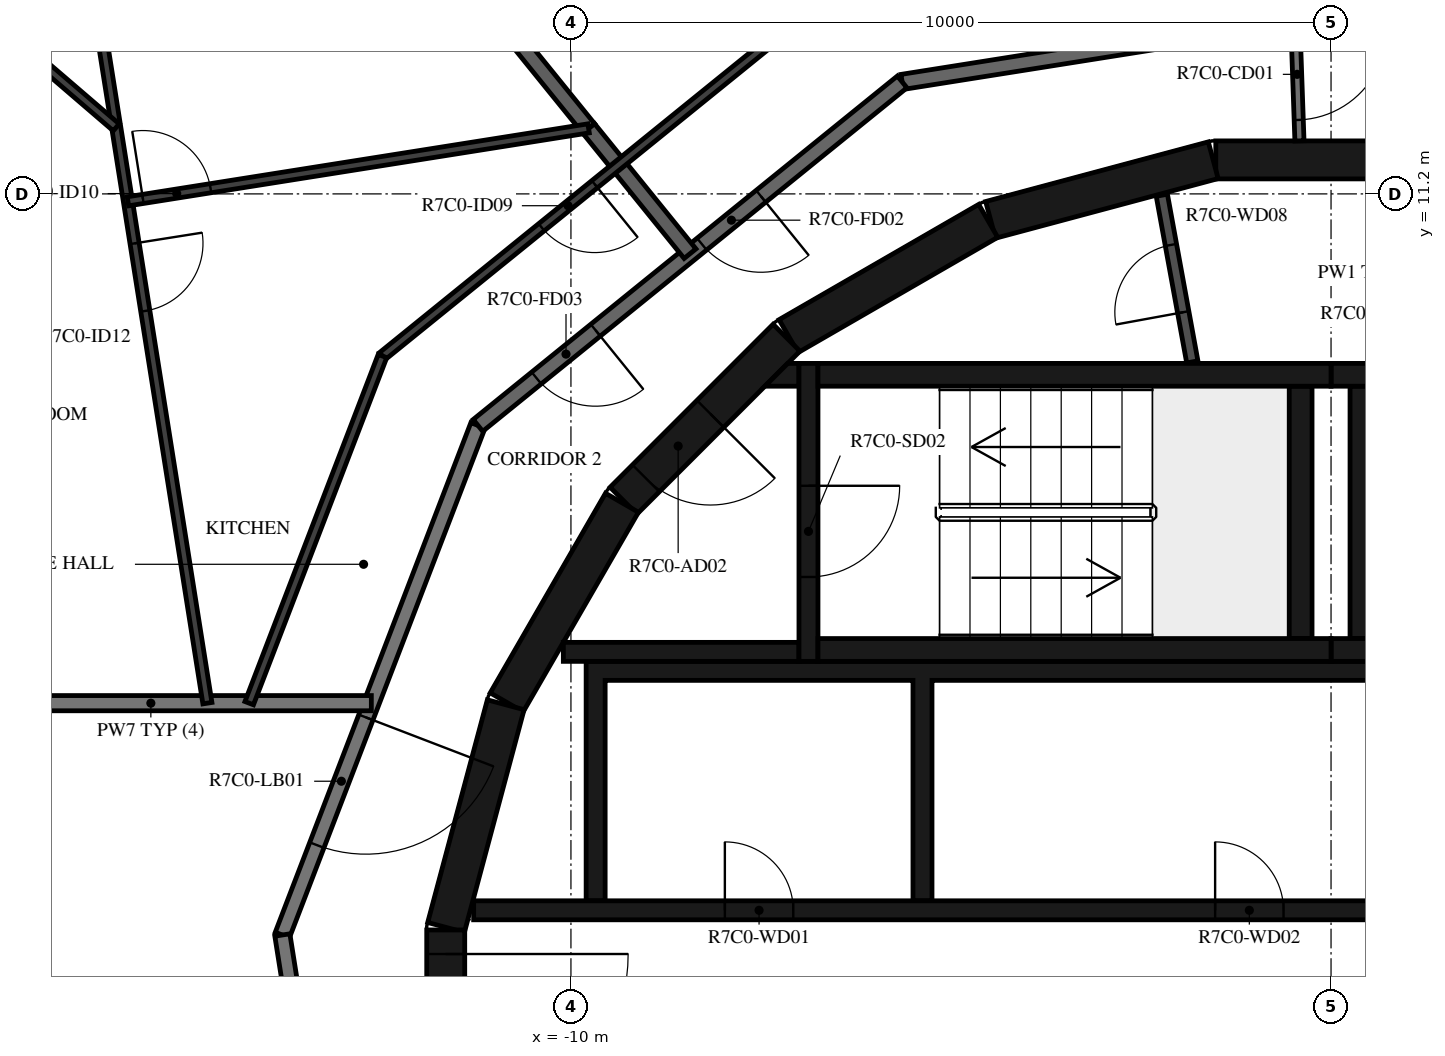
"""IFC4 building model, lengths in metres.
Left out: names, types, materials, properties, quantities, classifications, styles, units other than length and angle.
Written with IfcOpenShell. Run it as: python <this file> out.ifc"""

import sys

from ifc_helpers import new_model, si_unit, direction, frame, frame_2d, origin, place, context, subcontext, project, spatial, polyline, rectangle, outline, extrude, element, fill, save


model = new_model("IFC4")
c1 = context("Model", 3, precision=1e-05, world=origin(), true_north=direction((0.0, 1.0)))
c2 = subcontext(c1, "Body", "Model", "MODEL_VIEW")
j1 = project(units=[si_unit("LENGTHUNIT", "METRE"), si_unit("PLANEANGLEUNIT", "RADIAN")], contexts=[c1])
p1 = place(None, origin())
s1 = spatial("IfcSite", under=j1, at=p1, CompositionType="ELEMENT")
p2 = place(p1, origin())
s2 = spatial("IfcBuilding", under=s1, at=p2, CompositionType="ELEMENT")
p3 = place(p2, frame((0.0, 0.0, 284.4)))
s3 = spatial("IfcBuildingStorey", under=s2, at=p3, CompositionType="ELEMENT", Elevation=284.4)
for number, where, z_axis, x_axis in (
    (1, (1.516, 11.647, 0.0), (0.0, 0.0, 1.0), (-1.0, 0.0, 0.0)),
    (2, (-1.55, 11.643, 0.0), (0.0, 0.0, 1.0), (-0.966, -0.259, 0.0)),
    (3, (-4.51, 10.845, 0.0), (0.0, 0.0, 1.0), (-0.866, -0.5, 0.0)),
):
    element("IfcWall", number, at=place(p3, frame(where, z_axis=z_axis, x_axis=x_axis)), inside=s3, PredefinedType="SHEAR", context=c2, shape_type="SweptSolid", body=[
        extrude(rectangle(XDim=3.033, YDim=0.5, at=frame_2d((1.516, 0.0))), origin(), (0.0, 0.0, 1.0), 3.12),
    ])
p4 = place(p3, frame((-7.164, 9.308, 0.0), z_axis=(0.0, 0.0, 1.0), x_axis=(-0.707106781187, -0.707106781187, 0.0)))
e4 = element("IfcWall", 4, at=p4, inside=s3, PredefinedType="SHEAR", context=c2, shape_type="SweptSolid", body=[
    extrude(rectangle(XDim=3.032, YDim=0.5, at=frame_2d((1.516, 0.0))), origin(), (0.0, 0.0, 1.0), 3.12),
])
p5 = place(p4, frame((1.416, 0.0, 0.0)))
e5 = element("IfcOpeningElement", 5, at=p5, cuts=e4, PredefinedType="OPENING", context=c2, shape_type="SweptSolid", body=[
    extrude(rectangle(XDim=1.2, YDim=2.1, at=frame_2d((0.6, 1.05))), frame((0.0, 0.26, 0.0), z_axis=(0.0, -1.0, 0.0), x_axis=(1.0, 0.0, 0.0)), (0.0, 0.0, 1.0), 0.52),
])
for number, where, z_axis, x_axis in (
    (6, (-9.329, 7.137, 0.0), (0.0, 0.0, 1.0), (-0.5, -0.866, 0.0)),
    (7, (-10.858, 4.479, 0.0), (0.0, 0.0, 1.0), (-0.259, -0.966, 0.0)),
):
    element("IfcWall", number, at=place(p3, frame(where, z_axis=z_axis, x_axis=x_axis)), inside=s3, PredefinedType="SHEAR", context=c2, shape_type="SweptSolid", body=[
        extrude(rectangle(XDim=3.033, YDim=0.5, at=frame_2d((1.516, 0.0))), origin(), (0.0, 0.0, 1.0), 3.12),
    ])
p6 = place(p3, frame((-11.647, 1.516, 0.0), z_axis=(0.0, 0.0, 1.0), x_axis=(0.0, -1.0, 0.0)))
e8 = element("IfcWall", 8, at=p6, inside=s3, PredefinedType="SHEAR", context=c2, shape_type="SweptSolid", body=[
    extrude(rectangle(XDim=3.033, YDim=0.5, at=frame_2d((1.516, 0.0))), origin(), (0.0, 0.0, 1.0), 3.12),
])
p7 = place(p6, frame((0.316, 0.0, 0.0)))
e9 = element("IfcOpeningElement", 9, at=p7, cuts=e8, PredefinedType="OPENING", context=c2, shape_type="SweptSolid", body=[
    extrude(rectangle(XDim=2.4, YDim=2.1, at=frame_2d((1.2, 1.05))), frame((0.0, 0.26, 0.0), z_axis=(0.0, -1.0, 0.0), x_axis=(1.0, 0.0, 0.0)), (0.0, 0.0, 1.0), 0.52),
])
for number, where, z_axis, x_axis in (
    (10, (0.0, 5.2, 0.0), (0.0, 0.0, 1.0), (1.0, 0.0, 0.0)),
    (11, (0.0, 8.82, 0.0), (0.0, 0.0, 1.0), (1.0, 0.0, 0.0)),
):
    element("IfcWall", number, at=place(p3, frame(where, z_axis=z_axis, x_axis=x_axis)), inside=s3, PredefinedType="SHEAR", context=c2, shape_type="SweptSolid", body=[
        extrude(rectangle(XDim=6.75, YDim=0.3, at=frame_2d((3.375, 0.0))), origin(), (0.0, 0.0, 1.0), 3.12),
    ])
p8 = place(p3, frame((0.4, 5.35, 0.0), z_axis=(0.0, 0.0, 1.0), x_axis=(0.0, 1.0, 0.0)))
e12 = element("IfcWall", 12, at=p8, inside=s3, PredefinedType="SHEAR", context=c2, shape_type="SweptSolid", body=[
    extrude(rectangle(XDim=3.32, YDim=0.3, at=frame_2d((1.66, 0.0))), origin(), (0.0, 0.0, 1.0), 3.12),
])
for number, where, z_axis, x_axis in (
    (13, (-6.75, 5.2, 0.0), (0.0, 0.0, 1.0), (1.0, 0.0, 0.0)),
    (14, (-6.75, 8.82, 0.0), (0.0, 0.0, 1.0), (1.0, 0.0, 0.0)),
):
    element("IfcWall", number, at=place(p3, frame(where, z_axis=z_axis, x_axis=x_axis)), inside=s3, PredefinedType="SHEAR", context=c2, shape_type="SweptSolid", body=[
        extrude(rectangle(XDim=6.75, YDim=0.3, at=frame_2d((3.375, 0.0))), origin(), (0.0, 0.0, 1.0), 3.12),
    ])
p9 = place(p3, frame((-0.4, 5.35, 0.0), z_axis=(0.0, 0.0, 1.0), x_axis=(0.0, 1.0, 0.0)))
e15 = element("IfcWall", 15, at=p9, inside=s3, PredefinedType="SHEAR", context=c2, shape_type="SweptSolid", body=[
    extrude(rectangle(XDim=3.32, YDim=0.3, at=frame_2d((1.66, 0.0))), origin(), (0.0, 0.0, 1.0), 3.12),
])
p10 = place(p3, frame((-6.875, 8.97, 0.0), z_axis=(0.0, 0.0, 1.0), x_axis=(0.0, -1.0, 0.0)))
e16 = element("IfcWall", 16, at=p10, inside=s3, PredefinedType="SHEAR", context=c2, shape_type="SweptSolid", body=[
    extrude(rectangle(XDim=3.92, YDim=0.25, at=frame_2d((1.96, 0.0))), origin(), (0.0, 0.0, 1.0), 3.12),
])
p11 = place(p10, frame((1.61, 0.0, 0.0)))
e17 = element("IfcOpeningElement", 17, at=p11, cuts=e16, PredefinedType="OPENING", context=c2, shape_type="SweptSolid", body=[
    extrude(rectangle(XDim=1.2, YDim=2.1, at=frame_2d((0.6, 1.05))), frame((0.0, 0.135, 0.0), z_axis=(0.0, -1.0, 0.0), x_axis=(1.0, 0.0, 0.0)), (0.0, 0.0, 1.0), 0.27),
])
p12 = place(p3, frame((-7.0, 5.175, 0.0), z_axis=(0.0, 0.0, 1.0), x_axis=(-1.0, 0.0, 0.0)))
e18 = element("IfcWall", 18, at=p12, inside=s3, PredefinedType="SHEAR", context=c2, shape_type="SweptSolid", body=[
    extrude(rectangle(XDim=3.1, YDim=0.25, at=frame_2d((1.55, 0.0))), origin(), (0.0, 0.0, 1.0), 3.12),
])
p13 = place(p3, origin())
e19 = element("IfcWall", 19, at=p13, inside=s3, PredefinedType="SHEAR", context=c2, shape_type="SweptSolid", body=[
    extrude(outline(polyline([(-7.148, 8.97), (-7.0, 8.97), (-7.0, 8.67), (-7.448, 8.67), (-7.148, 8.97)])), origin(), (0.0, 0.0, 1.0), 3.12),
])
p14 = place(p3, origin())
e20 = element("IfcWall", 20, at=p14, inside=s3, PredefinedType="SHEAR", context=c2, shape_type="SweptSolid", body=[
    extrude(outline(polyline([(-9.8, 1.9), (-9.55, 1.9), (-9.55, 4.8), (-5.5, 4.8), (-5.5, 1.9), (-5.25, 1.9), (-5.25, 4.8), (3.1, 4.8), (3.1, 1.9), (3.35, 1.9), (3.35, 4.8), (5.25, 4.8), (5.25, 1.9), (5.5, 1.9), (5.5, 4.8), (7.4, 4.8), (7.4, 1.9), (7.65, 1.9), (7.65, 4.8), (9.55, 4.8), (9.55, 1.9), (9.8, 1.9), (9.8, 4.8), (9.8, 5.05), (-9.8, 5.05), (-9.8, 4.8), (-9.8, 1.9)])), origin(), (0.0, 0.0, 1.0), 3.12),
])
p15 = place(p3, frame((-11.28, 1.775, 0.0), z_axis=(0.0, 0.0, 1.0), x_axis=(1.0, 0.0, 0.0)))
e21 = element("IfcWall", 21, at=p15, inside=s3, PredefinedType="SHEAR", context=c2, shape_type="SweptSolid", body=[
    extrude(rectangle(XDim=14.38, YDim=0.25, at=frame_2d((7.19, 0.0))), origin(), (0.0, 0.0, 1.0), 3.12),
])
p16 = place(p15, frame((3.305, 0.0, 0.0)))
e22 = element("IfcOpeningElement", 22, at=p16, cuts=e21, PredefinedType="OPENING", context=c2, shape_type="SweptSolid", body=[
    extrude(rectangle(XDim=0.9, YDim=2.1, at=frame_2d((0.45, 1.05))), frame((0.0, 0.135, 0.0), z_axis=(0.0, -1.0, 0.0), x_axis=(1.0, 0.0, 0.0)), (0.0, 0.0, 1.0), 0.27),
])
p17 = place(p15, frame((9.755, 0.0, 0.0)))
e23 = element("IfcOpeningElement", 23, at=p17, cuts=e21, PredefinedType="OPENING", context=c2, shape_type="SweptSolid", body=[
    extrude(rectangle(XDim=0.9, YDim=2.1, at=frame_2d((0.45, 1.05))), frame((0.0, 0.135, 0.0), z_axis=(0.0, -1.0, 0.0), x_axis=(1.0, 0.0, 0.0)), (0.0, 0.0, 1.0), 0.27),
])
p18 = place(p3, frame((-1.825, 8.99, 0.0), z_axis=(0.0, 0.0, 1.0), x_axis=(-0.179955206115, 0.983674805915, 0.0)))
e24 = element("IfcWall", 24, at=p18, inside=s3, PredefinedType="PARTITIONING", context=c2, shape_type="SweptSolid", body=[
    extrude(rectangle(XDim=2.229, YDim=0.15, at=frame_2d((1.115, 0.0))), origin(), (0.0, 0.0, 1.0), 3.12),
])
p19 = place(p18, frame((0.665, 0.0, 0.0)))
e25 = element("IfcOpeningElement", 25, at=p19, cuts=e24, PredefinedType="OPENING", context=c2, shape_type="SweptSolid", body=[
    extrude(rectangle(XDim=0.9, YDim=2.1, at=frame_2d((0.45, 1.05))), frame((0.0, 0.085, 0.0), z_axis=(0.0, -1.0, 0.0), x_axis=(1.0, 0.0, 0.0)), (0.0, 0.0, 1.0), 0.17),
])
p20 = place(p3, frame((-0.471, 13.492, 0.0), z_axis=(0.0, 0.0, 1.0), x_axis=(0.034873173869, -0.999391745886, 0.0)))
e26 = element("IfcWall", 26, at=p20, inside=s3, PredefinedType="PARTITIONING", context=c2, shape_type="SweptSolid", body=[
    extrude(rectangle(XDim=1.596, YDim=0.12, at=frame_2d((0.798, 0.0))), origin(), (0.0, 0.0, 1.0), 3.12),
])
p21 = place(p20, frame((0.12, 0.0, 0.0)))
e27 = element("IfcOpeningElement", 27, at=p21, cuts=e26, PredefinedType="OPENING", context=c2, shape_type="SweptSolid", body=[
    extrude(rectangle(XDim=1.2, YDim=2.1, at=frame_2d((0.6, 1.05))), frame((0.0, 0.07, 0.0), z_axis=(0.0, -1.0, 0.0), x_axis=(1.0, 0.0, 0.0)), (0.0, 0.0, 1.0), 0.14),
])
p22 = place(p3, frame((1.45, 13.797, 0.0), z_axis=(0.0, 0.0, 1.0), x_axis=(-0.987690361611, -0.156421704315, 0.0)))
e28 = element("IfcWall", 28, at=p22, inside=s3, PredefinedType="STANDARD", context=c2, shape_type="SweptSolid", body=[
    extrude(rectangle(XDim=7.181, YDim=0.2, at=frame_2d((3.591, 0.0))), origin(), (0.0, 0.0, 1.0), 3.12),
])
p23 = place(p3, frame((-11.223, 8.154, 0.0), z_axis=(0.0, 0.0, 1.0), x_axis=(-0.358341090983, -0.93359073609, 0.0)))
e29 = element("IfcWall", 29, at=p23, inside=s3, PredefinedType="STANDARD", context=c2, shape_type="SweptSolid", body=[
    extrude(rectangle(XDim=7.181, YDim=0.2, at=frame_2d((3.59, 0.0))), origin(), (0.0, 0.0, 1.0), 3.12),
])
p24 = place(p23, frame((4.114, 0.0, 0.0)))
e30 = element("IfcOpeningElement", 30, at=p24, cuts=e29, PredefinedType="OPENING", context=c2, shape_type="SweptSolid", body=[
    extrude(rectangle(XDim=1.8, YDim=2.1, at=frame_2d((0.9, 1.05))), frame((0.0, 0.11, 0.0), z_axis=(0.0, -1.0, 0.0), x_axis=(1.0, 0.0, 0.0)), (0.0, 0.0, 1.0), 0.22),
])
p25 = place(p3, frame((-13.797, 1.45, 0.0), z_axis=(0.0, 0.0, 1.0), x_axis=(0.156421704315, -0.987690361611, 0.0)))
e31 = element("IfcWall", 31, at=p25, inside=s3, PredefinedType="STANDARD", context=c2, shape_type="SweptSolid", body=[
    extrude(rectangle(XDim=7.181, YDim=0.2, at=frame_2d((3.591, 0.0))), origin(), (0.0, 0.0, 1.0), 3.12),
])
p26 = place(p3, frame((-5.643, 12.673, 0.0), z_axis=(0.0, 0.0, 1.0), x_axis=(-0.777160148113, -0.629302871585, 0.0)))
e32 = element("IfcWall", 32, at=p26, inside=s3, PredefinedType="STANDARD", context=c2, shape_type="SweptSolid", body=[
    extrude(rectangle(XDim=7.181, YDim=0.2, at=frame_2d((3.59, 0.0))), origin(), (0.0, 0.0, 1.0), 3.12),
])
p27 = place(p26, frame((2.39, 0.0, 0.0)))
e33 = element("IfcOpeningElement", 33, at=p27, cuts=e32, PredefinedType="OPENING", context=c2, shape_type="SweptSolid", body=[
    extrude(rectangle(XDim=1.0, YDim=2.1, at=frame_2d((0.5, 1.05))), frame((0.0, 0.11, 0.0), z_axis=(0.0, -1.0, 0.0), x_axis=(1.0, 0.0, 0.0)), (0.0, 0.0, 1.0), 0.22),
])
p28 = place(p26, frame((5.19, 0.0, 0.0)))
e34 = element("IfcOpeningElement", 34, at=p28, cuts=e32, PredefinedType="OPENING", context=c2, shape_type="SweptSolid", body=[
    extrude(rectangle(XDim=1.0, YDim=2.1, at=frame_2d((0.5, 1.05))), frame((0.0, 0.11, 0.0), z_axis=(0.0, -1.0, 0.0), x_axis=(1.0, 0.0, 0.0)), (0.0, 0.0, 1.0), 0.22),
])
p29 = place(p3, frame((-12.626, 4.5, 0.0), z_axis=(0.0, 0.0, 1.0), x_axis=(-1.0, 0.0, 0.0)))
e35 = element("IfcWall", 35, at=p29, inside=s3, PredefinedType="STANDARD", context=c2, shape_type="SweptSolid", body=[
    extrude(rectangle(XDim=5.802, YDim=0.2, at=frame_2d((2.901, 0.0))), origin(), (0.0, 0.0, 1.0), 3.12),
])
p30 = place(p3, frame((-9.768, 12.062, 0.0), z_axis=(0.0, 0.0, 1.0), x_axis=(0.629274383598, -0.777183215302, 0.0)))
e36 = element("IfcWall", 36, at=p30, inside=s3, PredefinedType="STANDARD", context=c2, shape_type="SweptSolid", body=[
    extrude(rectangle(XDim=2.121, YDim=0.2, at=frame_2d((1.061, 0.0))), origin(), (0.0, 0.0, 1.0), 3.12),
])
p31 = place(p3, frame((-10.779, 13.311, 0.0), z_axis=(0.0, 0.0, 1.0), x_axis=(0.629373100483, -0.77710327524, 0.0)))
e37 = element("IfcWall", 37, at=p31, inside=s3, PredefinedType="STANDARD", context=c2, shape_type="SweptSolid", body=[
    extrude(rectangle(XDim=1.606, YDim=0.2, at=frame_2d((0.803, 0.0))), origin(), (0.0, 0.0, 1.0), 3.12),
])
p32 = place(p3, frame((-7.363, 13.21, 0.0), z_axis=(0.0, 0.0, 1.0), x_axis=(-0.777139504663, -0.629328364443, 0.0)))
e38 = element("IfcWall", 38, at=p32, inside=s3, PredefinedType="PARTITIONING", context=c2, shape_type="SweptSolid", body=[
    extrude(rectangle(XDim=6.584, YDim=0.12, at=frame_2d((3.292, 0.0))), origin(), (0.0, 0.0, 1.0), 3.12),
])
p33 = place(p32, frame((2.991, 0.0, 0.0)))
e39 = element("IfcOpeningElement", 39, at=p33, cuts=e38, PredefinedType="OPENING", context=c2, shape_type="SweptSolid", body=[
    extrude(rectangle(XDim=0.9, YDim=2.1, at=frame_2d((0.45, 1.05))), frame((0.0, 0.07, 0.0), z_axis=(0.0, -1.0, 0.0), x_axis=(1.0, 0.0, 0.0)), (0.0, 0.0, 1.0), 0.14),
])
p34 = place(p3, frame((-12.479, 9.067, 0.0), z_axis=(0.0, 0.0, 1.0), x_axis=(-0.358387060848, -0.933573090131, 0.0)))
e40 = element("IfcWall", 40, at=p34, inside=s3, PredefinedType="PARTITIONING", context=c2, shape_type="SweptSolid", body=[
    extrude(rectangle(XDim=4.892, YDim=0.12, at=frame_2d((2.446, 0.0))), origin(), (0.0, 0.0, 1.0), 3.12),
])
p35 = place(p3, frame((-16.266, 13.865, 0.0), z_axis=(0.0, 0.0, 1.0), x_axis=(0.156422690833, -0.987690205374, 0.0)))
e41 = element("IfcWall", 41, at=p35, inside=s3, PredefinedType="PARTITIONING", context=c2, shape_type="SweptSolid", body=[
    extrude(rectangle(XDim=9.482, YDim=0.12, at=frame_2d((4.741, 0.0))), origin(), (0.0, 0.0, 1.0), 3.12),
])
p36 = place(p35, frame((3.357, 0.0, 0.0)))
e42 = element("IfcOpeningElement", 42, at=p36, cuts=e41, PredefinedType="OPENING", context=c2, shape_type="SweptSolid", body=[
    extrude(rectangle(XDim=0.9, YDim=2.1, at=frame_2d((0.45, 1.05))), frame((0.0, 0.07, 0.0), z_axis=(0.0, -1.0, 0.0), x_axis=(1.0, 0.0, 0.0)), (0.0, 0.0, 1.0), 0.14),
])
p37 = place(p3, frame((-15.828, 11.102, 0.0), z_axis=(0.0, 0.0, 1.0), x_axis=(0.98768671358, 0.156444737262, 0.0)))
e43 = element("IfcWall", 43, at=p37, inside=s3, PredefinedType="PARTITIONING", context=c2, shape_type="SweptSolid", body=[
    extrude(rectangle(XDim=6.136, YDim=0.12, at=frame_2d((3.068, 0.0))), origin(), (0.0, 0.0, 1.0), 3.12),
])
p38 = place(p37, frame((0.2, 0.0, 0.0)))
e44 = element("IfcOpeningElement", 44, at=p38, cuts=e43, PredefinedType="OPENING", context=c2, shape_type="SweptSolid", body=[
    extrude(rectangle(XDim=0.9, YDim=2.1, at=frame_2d((0.45, 1.05))), frame((0.0, 0.07, 0.0), z_axis=(0.0, -1.0, 0.0), x_axis=(1.0, 0.0, 0.0)), (0.0, 0.0, 1.0), 0.14),
])
p39 = place(p3, frame((-19.913, 15.451, 0.0), z_axis=(0.0, 0.0, 1.0), x_axis=(0.758627615547, -0.651524474544, 0.0)))
e45 = element("IfcWall", 45, at=p39, inside=s3, PredefinedType="PARTITIONING", context=c2, shape_type="SweptSolid", body=[
    extrude(rectangle(XDim=5.181, YDim=0.12, at=frame_2d((2.591, 0.0))), origin(), (0.0, 0.0, 1.0), 3.12),
])
p40 = place(p11, origin())
e46 = element("IfcDoor", 46, at=p40, inside=s3, OperationType="SINGLE_SWING_LEFT", PredefinedType="DOOR", context=c2, shape_type="SweptSolid", body=[
    extrude(rectangle(XDim=1.2, YDim=2.1, at=frame_2d((0.6, 1.05))), frame((0.0, 0.025, 0.0), z_axis=(0.0, -1.0, 0.0), x_axis=(1.0, 0.0, 0.0)), (0.0, 0.0, 1.0), 0.05),
])
fill(e17, e46)
p41 = place(p5, origin())
e47 = element("IfcDoor", 47, at=p41, inside=s3, OperationType="SINGLE_SWING_RIGHT", PredefinedType="DOOR", context=c2, shape_type="SweptSolid", body=[
    extrude(rectangle(XDim=1.2, YDim=2.1, at=frame_2d((0.6, 1.05))), frame((0.0, 0.025, 0.0), z_axis=(0.0, -1.0, 0.0), x_axis=(1.0, 0.0, 0.0)), (0.0, 0.0, 1.0), 0.05),
])
fill(e5, e47)
p42 = place(p7, origin())
e48 = element("IfcDoor", 48, at=p42, inside=s3, OperationType="DOUBLE_DOOR_SINGLE_SWING", PredefinedType="DOOR", context=c2, shape_type="SweptSolid", body=[
    extrude(rectangle(XDim=2.4, YDim=2.1, at=frame_2d((1.2, 1.05))), frame((0.0, 0.025, 0.0), z_axis=(0.0, -1.0, 0.0), x_axis=(1.0, 0.0, 0.0)), (0.0, 0.0, 1.0), 0.05),
])
fill(e9, e48)
p43 = place(p16, origin())
e49 = element("IfcDoor", 49, at=p43, inside=s3, OperationType="SINGLE_SWING_LEFT", PredefinedType="DOOR", context=c2, shape_type="SweptSolid", body=[
    extrude(rectangle(XDim=0.9, YDim=2.1, at=frame_2d((0.45, 1.05))), frame((0.0, 0.025, 0.0), z_axis=(0.0, -1.0, 0.0), x_axis=(1.0, 0.0, 0.0)), (0.0, 0.0, 1.0), 0.05),
])
fill(e22, e49)
p44 = place(p17, origin())
e50 = element("IfcDoor", 50, at=p44, inside=s3, OperationType="SINGLE_SWING_RIGHT", PredefinedType="DOOR", context=c2, shape_type="SweptSolid", body=[
    extrude(rectangle(XDim=0.9, YDim=2.1, at=frame_2d((0.45, 1.05))), frame((0.0, 0.025, 0.0), z_axis=(0.0, -1.0, 0.0), x_axis=(1.0, 0.0, 0.0)), (0.0, 0.0, 1.0), 0.05),
])
fill(e23, e50)
p45 = place(p19, origin())
e51 = element("IfcDoor", 51, at=p45, inside=s3, OperationType="SINGLE_SWING_RIGHT", PredefinedType="DOOR", context=c2, shape_type="SweptSolid", body=[
    extrude(rectangle(XDim=0.9, YDim=2.1, at=frame_2d((0.45, 1.05))), frame((0.0, 0.025, 0.0), z_axis=(0.0, -1.0, 0.0), x_axis=(1.0, 0.0, 0.0)), (0.0, 0.0, 1.0), 0.05),
])
fill(e25, e51)
p46 = place(p27, origin())
e52 = element("IfcDoor", 52, at=p46, inside=s3, OperationType="SINGLE_SWING_RIGHT", PredefinedType="DOOR", context=c2, shape_type="SweptSolid", body=[
    extrude(rectangle(XDim=1.0, YDim=2.1, at=frame_2d((0.5, 1.05))), frame((0.0, 0.025, 0.0), z_axis=(0.0, -1.0, 0.0), x_axis=(1.0, 0.0, 0.0)), (0.0, 0.0, 1.0), 0.05),
])
fill(e33, e52)
p47 = place(p28, origin())
e53 = element("IfcDoor", 53, at=p47, inside=s3, OperationType="SINGLE_SWING_LEFT", PredefinedType="DOOR", context=c2, shape_type="SweptSolid", body=[
    extrude(rectangle(XDim=1.0, YDim=2.1, at=frame_2d((0.5, 1.05))), frame((0.0, 0.025, 0.0), z_axis=(0.0, -1.0, 0.0), x_axis=(1.0, 0.0, 0.0)), (0.0, 0.0, 1.0), 0.05),
])
fill(e34, e53)
p48 = place(p33, origin())
e54 = element("IfcDoor", 54, at=p48, inside=s3, OperationType="SINGLE_SWING_LEFT", PredefinedType="DOOR", context=c2, shape_type="SweptSolid", body=[
    extrude(rectangle(XDim=0.9, YDim=2.1, at=frame_2d((0.45, 1.05))), frame((0.0, 0.025, 0.0), z_axis=(0.0, -1.0, 0.0), x_axis=(1.0, 0.0, 0.0)), (0.0, 0.0, 1.0), 0.05),
])
fill(e39, e54)
p49 = place(p38, origin())
e55 = element("IfcDoor", 55, at=p49, inside=s3, OperationType="SINGLE_SWING_LEFT", PredefinedType="DOOR", context=c2, shape_type="SweptSolid", body=[
    extrude(rectangle(XDim=0.9, YDim=2.1, at=frame_2d((0.45, 1.05))), frame((0.0, 0.025, 0.0), z_axis=(0.0, -1.0, 0.0), x_axis=(1.0, 0.0, 0.0)), (0.0, 0.0, 1.0), 0.05),
])
fill(e44, e55)
p50 = place(p36, origin())
e56 = element("IfcDoor", 56, at=p50, inside=s3, OperationType="SINGLE_SWING_LEFT", PredefinedType="DOOR", context=c2, shape_type="SweptSolid", body=[
    extrude(rectangle(XDim=0.9, YDim=2.1, at=frame_2d((0.45, 1.05))), frame((0.0, 0.025, 0.0), z_axis=(0.0, -1.0, 0.0), x_axis=(1.0, 0.0, 0.0)), (0.0, 0.0, 1.0), 0.05),
])
fill(e42, e56)
p51 = place(p21, origin())
e57 = element("IfcDoor", 57, at=p51, inside=s3, OperationType="DOUBLE_DOOR_SINGLE_SWING", PredefinedType="DOOR", context=c2, shape_type="SweptSolid", body=[
    extrude(rectangle(XDim=1.2, YDim=2.1, at=frame_2d((0.6, 1.05))), frame((0.0, 0.025, 0.0), z_axis=(0.0, -1.0, 0.0), x_axis=(1.0, 0.0, 0.0)), (0.0, 0.0, 1.0), 0.05),
])
fill(e27, e57)
p52 = place(p24, origin())
e58 = element("IfcDoor", 58, at=p52, inside=s3, OperationType="DOUBLE_DOOR_SINGLE_SWING", PredefinedType="DOOR", context=c2, shape_type="SweptSolid", body=[
    extrude(rectangle(XDim=1.8, YDim=2.1, at=frame_2d((0.9, 1.05))), frame((0.0, 0.025, 0.0), z_axis=(0.0, -1.0, 0.0), x_axis=(1.0, 0.0, 0.0)), (0.0, 0.0, 1.0), 0.05),
])
fill(e30, e58)
save(model, sys.argv[1])
